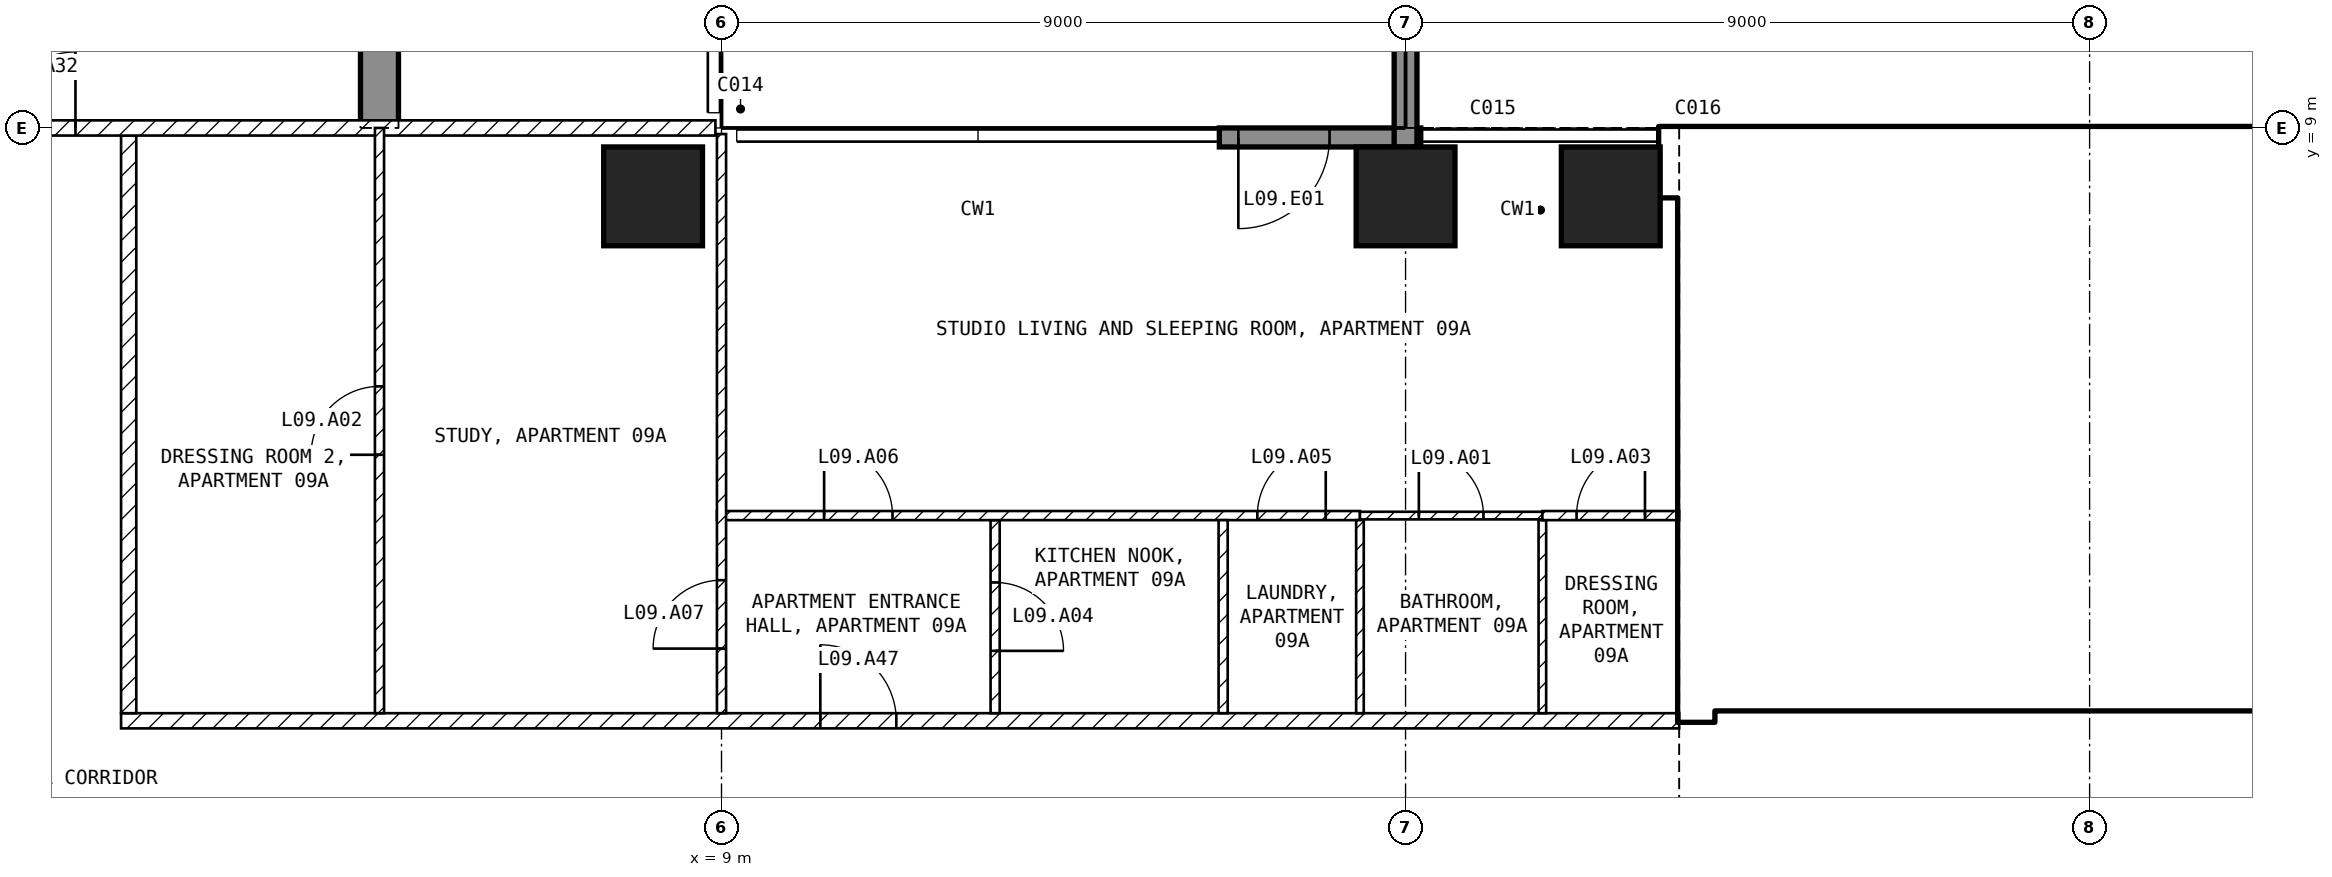
"""IFC4 building model, lengths in metres.
Left out: names, types, materials, properties, quantities, classifications, styles, units other than length and angle.
Written with IfcOpenShell. Run it as: python <this file> out.ifc"""

import sys

from ifc_helpers import new_model, si_unit, direction, frame, frame_2d, origin, origin_2d, place, context, subcontext, project, spatial, polyline, rectangle, outline, extrude, element, fill, save


model = new_model("IFC4")
c1 = context("Model", 3, precision=1e-05, world=origin(), true_north=direction((0.0, 1.0)))
c2 = subcontext(c1, "Body", "Model", "MODEL_VIEW")
j1 = project(units=[si_unit("LENGTHUNIT", "METRE"), si_unit("PLANEANGLEUNIT", "RADIAN")], contexts=[c1])
p1 = place(None, origin())
s1 = spatial("IfcSite", under=j1, at=p1, CompositionType="ELEMENT")
p2 = place(p1, origin())
s2 = spatial("IfcBuilding", under=s1, at=p2, CompositionType="ELEMENT")
p3 = place(p2, frame((0.0, 0.0, 50.5)))
s3 = spatial("IfcBuildingStorey", under=s2, at=p3, CompositionType="ELEMENT", Elevation=50.5)
for number, where, z_axis, x_axis in (
    (1, (8.1, 8.1, -0.25), (0.0, 0.0, 1.0), (1.0, 0.0, 0.0)),
    (2, (18.0, 8.1, -0.25), (0.0, 0.0, 1.0), (1.0, 0.0, 0.0)),
    (3, (20.7, 8.1, -0.25), (0.0, 0.0, 1.0), (1.0, 0.0, 0.0)),
):
    element("IfcColumn", number, at=place(p3, frame(where, z_axis=z_axis, x_axis=x_axis)), inside=s3, PredefinedType="COLUMN", context=c2, shape_type="SweptSolid", body=[
        extrude(rectangle(XDim=1.3, YDim=1.3, at=origin_2d()), origin(), (0.0, 0.0, 1.0), 3.5),
    ])
p4 = place(p3, frame((4.25, 9.0, -0.25), z_axis=(1.0, 0.0, 0.0), x_axis=(0.0, 1.0, 0.0)))
e4 = element("IfcWall", 4, at=p4, inside=s3, PredefinedType="SHEAR", context=c2, shape_type="SweptSolid", body=[
    extrude(outline(polyline([(0.0, 0.0), (2.1, 0.0), (2.1, 2.65), (4.5, 2.65), (4.5, 0.0), (9.9, 0.0), (9.9, 2.65), (12.3, 2.65), (12.3, 0.0), (16.45, 0.0), (16.45, 3.5), (0.0, 3.5), (0.0, 0.0)])), origin(), (0.0, 0.0, 1.0), 0.5),
])
p5 = place(p3, frame((18.2, 8.875, 0.0), z_axis=(0.0, 0.0, 1.0), x_axis=(-1.0, 0.0, 0.0)))
e5 = element("IfcWall", 5, at=p5, inside=s3, PredefinedType="SOLIDWALL", context=c2, shape_type="SweptSolid", body=[
    extrude(rectangle(XDim=2.65, YDim=0.25, at=frame_2d((1.325, 0.0))), origin(), (0.0, 0.0, 1.0), 3.25),
])
p6 = place(p5, frame((1.2, 0.0, 0.0)))
e6 = element("IfcOpeningElement", 6, at=p6, cuts=e5, PredefinedType="OPENING", context=c2, shape_type="SweptSolid", body=[
    extrude(rectangle(XDim=1.2, YDim=2.4, at=frame_2d((0.6, 1.2))), frame((0.0, 0.135, 0.0), z_axis=(0.0, -1.0, 0.0), x_axis=(1.0, 0.0, 0.0)), (0.0, 0.0, 1.0), 0.27),
])
p7 = place(p3, frame((18.0, 8.75, 0.0), z_axis=(0.0, 0.0, 1.0), x_axis=(0.0, 1.0, 0.0)))
e7 = element("IfcWall", 7, at=p7, inside=s3, PredefinedType="SOLIDWALL", context=c2, shape_type="SweptSolid", body=[
    extrude(rectangle(XDim=2.95, YDim=0.3, at=frame_2d((1.475, 0.0))), origin(), (0.0, 0.0, 1.0), 3.25),
])
p8 = place(p3, frame((21.35, 8.55, 0.0), z_axis=(0.0, 0.0, 1.0), x_axis=(1.0, 0.0, 0.0)))
e8 = element("IfcWall", 8, at=p8, inside=s3, PredefinedType="SHEAR", context=c2, shape_type="SweptSolid", body=[
    extrude(rectangle(XDim=10.15, YDim=0.9, at=frame_2d((5.075, 0.0))), origin(), (0.0, 0.0, 1.0), 3.25),
])
p9 = place(p3, frame((21.825, 1.2, 0.0), z_axis=(0.0, 0.0, 1.0), x_axis=(0.0, 1.0, 0.0)))
e9 = element("IfcWall", 9, at=p9, inside=s3, PredefinedType="SHEAR", context=c2, shape_type="SweptSolid", body=[
    extrude(rectangle(XDim=6.9, YDim=0.45, at=frame_2d((3.45, 0.0))), origin(), (0.0, 0.0, 1.0), 3.25),
])
p10 = place(p3, frame((22.05, 1.45, 0.0), z_axis=(0.0, 0.0, 1.0), x_axis=(1.0, 0.0, 0.0)))
e10 = element("IfcWall", 10, at=p10, inside=s3, PredefinedType="SOLIDWALL", context=c2, shape_type="SweptSolid", body=[
    extrude(rectangle(XDim=13.05, YDim=0.2, at=frame_2d((6.525, 0.0))), origin(), (0.0, 0.0, 1.0), 3.25),
])
p11 = place(p10, frame((0.75, 0.0, 0.0)))
e11 = element("IfcOpeningElement", 11, at=p11, cuts=e10, PredefinedType="OPENING", context=c2, shape_type="SweptSolid", body=[
    extrude(rectangle(XDim=1.0, YDim=2.1, at=frame_2d((0.5, 1.05))), frame((0.0, 0.11, 0.0), z_axis=(0.0, -1.0, 0.0), x_axis=(1.0, 0.0, 0.0)), (0.0, 0.0, 1.0), 0.22),
])
p12 = place(p10, frame((3.25, 0.0, 0.0)))
e12 = element("IfcOpeningElement", 12, at=p12, cuts=e10, PredefinedType="OPENING", context=c2, shape_type="SweptSolid", body=[
    extrude(rectangle(XDim=1.0, YDim=2.1, at=frame_2d((0.5, 1.05))), frame((0.0, 0.11, 0.0), z_axis=(0.0, -1.0, 0.0), x_axis=(1.0, 0.0, 0.0)), (0.0, 0.0, 1.0), 0.22),
])
p13 = place(p3, frame((22.05, 5.15, 0.0), z_axis=(0.0, 0.0, 1.0), x_axis=(1.0, 0.0, 0.0)))
e13 = element("IfcWall", 13, at=p13, inside=s3, PredefinedType="SOLIDWALL", context=c2, shape_type="SweptSolid", body=[
    extrude(rectangle(XDim=6.3, YDim=0.2, at=frame_2d((3.15, 0.0))), origin(), (0.0, 0.0, 1.0), 3.25),
])
p14 = place(p13, frame((0.2, 0.0, 0.0)))
e14 = element("IfcOpeningElement", 14, at=p14, cuts=e13, PredefinedType="OPENING", context=c2, shape_type="SweptSolid", body=[
    extrude(rectangle(XDim=1.0, YDim=2.1, at=frame_2d((0.5, 1.05))), frame((0.0, 0.11, 0.0), z_axis=(0.0, -1.0, 0.0), x_axis=(1.0, 0.0, 0.0)), (0.0, 0.0, 1.0), 0.22),
])
p15 = place(p3, frame((28.25, 5.25, 0.0), z_axis=(0.0, 0.0, 1.0), x_axis=(0.0, 1.0, 0.0)))
e15 = element("IfcWall", 15, at=p15, inside=s3, PredefinedType="SOLIDWALL", context=c2, shape_type="SweptSolid", body=[
    extrude(rectangle(XDim=2.85, YDim=0.2, at=frame_2d((1.425, 0.0))), origin(), (0.0, 0.0, 1.0), 3.25),
])
p16 = place(p3, frame((27.2, 3.95, 0.0), z_axis=(0.0, 0.0, 1.0), x_axis=(1.0, 0.0, 0.0)))
e16 = element("IfcWall", 16, at=p16, inside=s3, PredefinedType="SOLIDWALL", context=c2, shape_type="SweptSolid", body=[
    extrude(rectangle(XDim=7.9, YDim=0.2, at=frame_2d((3.95, 0.0))), origin(), (0.0, 0.0, 1.0), 3.25),
])
p17 = place(p3, frame((27.1, 1.55, 0.0), z_axis=(0.0, 0.0, 1.0), x_axis=(0.0, 1.0, 0.0)))
e17 = element("IfcWall", 17, at=p17, inside=s3, PredefinedType="SOLIDWALL", context=c2, shape_type="SweptSolid", body=[
    extrude(rectangle(XDim=3.5, YDim=0.2, at=frame_2d((1.75, 0.0))), origin(), (0.0, 0.0, 1.0), 3.25),
])
p18 = place(p17, frame((0.6, 0.0, 0.0)))
e18 = element("IfcOpeningElement", 18, at=p18, cuts=e17, PredefinedType="OPENING", context=c2, shape_type="SweptSolid", body=[
    extrude(rectangle(XDim=1.1, YDim=2.1, at=frame_2d((0.55, 1.05))), frame((0.0, 0.11, 0.0), z_axis=(0.0, -1.0, 0.0), x_axis=(1.0, 0.0, 0.0)), (0.0, 0.0, 1.0), 0.22),
])
p19 = place(p17, frame((2.6, 0.0, 0.0)))
e19 = element("IfcOpeningElement", 19, at=p19, cuts=e17, PredefinedType="OPENING", context=c2, shape_type="SweptSolid", body=[
    extrude(rectangle(XDim=0.8, YDim=2.1, at=frame_2d((0.4, 1.05))), frame((0.0, 0.11, 0.0), z_axis=(0.0, -1.0, 0.0), x_axis=(1.0, 0.0, 0.0)), (0.0, 0.0, 1.0), 0.22),
])
p20 = place(p3, frame((1.1, 1.2, 0.0), z_axis=(0.0, 0.0, 1.0), x_axis=(1.0, 0.0, 0.0)))
e20 = element("IfcWall", 20, at=p20, inside=s3, PredefinedType="PARTITIONING", context=c2, shape_type="SweptSolid", body=[
    extrude(rectangle(XDim=20.5, YDim=0.2, at=frame_2d((10.25, 0.0))), origin(), (0.0, 0.0, 1.0), 3.25),
])
p21 = place(p20, frame((9.2, 0.0, 0.0)))
e21 = element("IfcOpeningElement", 21, at=p21, cuts=e20, PredefinedType="OPENING", context=c2, shape_type="SweptSolid", body=[
    extrude(rectangle(XDim=1.0, YDim=2.1, at=frame_2d((0.5, 1.05))), frame((0.0, 0.11, 0.0), z_axis=(0.0, -1.0, 0.0), x_axis=(1.0, 0.0, 0.0)), (0.0, 0.0, 1.0), 0.22),
])
p22 = place(p3, frame((1.2, 8.9, 0.0), z_axis=(0.0, 0.0, 1.0), x_axis=(0.0, -1.0, 0.0)))
e22 = element("IfcWall", 22, at=p22, inside=s3, PredefinedType="PARTITIONING", context=c2, shape_type="SweptSolid", body=[
    extrude(rectangle(XDim=7.6, YDim=0.2, at=frame_2d((3.8, 0.0))), origin(), (0.0, 0.0, 1.0), 3.25),
])
p23 = place(p3, frame((-8.92, 9.0, 0.0), z_axis=(0.0, 0.0, 1.0), x_axis=(1.0, 0.0, 0.0)))
e23 = element("IfcWall", 23, at=p23, inside=s3, PredefinedType="PARTITIONING", context=c2, shape_type="SweptSolid", body=[
    extrude(rectangle(XDim=17.84, YDim=0.2, at=frame_2d((8.92, 0.0))), origin(), (0.0, 0.0, 1.0), 3.25),
])
p24 = place(p23, frame((8.42, 0.0, 0.0)))
e24 = element("IfcOpeningElement", 24, at=p24, cuts=e23, PredefinedType="OPENING", context=c2, shape_type="SweptSolid", body=[
    extrude(rectangle(XDim=1.0, YDim=2.1, at=frame_2d((0.5, 1.05))), frame((0.0, 0.11, 0.0), z_axis=(0.0, -1.0, 0.0), x_axis=(1.0, 0.0, 0.0)), (0.0, 0.0, 1.0), 0.22),
])
p25 = place(p3, frame((12.6, 3.84, 0.0), z_axis=(0.0, 0.0, 1.0), x_axis=(0.0, -1.0, 0.0)))
e25 = element("IfcWall", 25, at=p25, inside=s3, PredefinedType="PARTITIONING", context=c2, shape_type="SweptSolid", body=[
    extrude(rectangle(XDim=2.54, YDim=0.12, at=frame_2d((1.27, 0.0))), origin(), (0.0, 0.0, 1.0), 3.25),
])
p26 = place(p25, frame((0.82, 0.0, 0.0)))
e26 = element("IfcOpeningElement", 26, at=p26, cuts=e25, PredefinedType="OPENING", context=c2, shape_type="SweptSolid", body=[
    extrude(rectangle(XDim=0.9, YDim=2.1, at=frame_2d((0.45, 1.05))), frame((0.0, 0.07, 0.0), z_axis=(0.0, -1.0, 0.0), x_axis=(1.0, 0.0, 0.0)), (0.0, 0.0, 1.0), 0.14),
])
p27 = place(p3, frame((8.94, 3.9, 0.0), z_axis=(0.0, 0.0, 1.0), x_axis=(1.0, 0.0, 0.0)))
e27 = element("IfcWall", 27, at=p27, inside=s3, PredefinedType="PARTITIONING", context=c2, shape_type="SweptSolid", body=[
    extrude(rectangle(XDim=8.46, YDim=0.12, at=frame_2d((4.23, 0.0))), origin(), (0.0, 0.0, 1.0), 3.25),
])
p28 = place(p27, frame((7.11, 0.0, 0.0)))
e28 = element("IfcOpeningElement", 28, at=p28, cuts=e27, PredefinedType="OPENING", context=c2, shape_type="SweptSolid", body=[
    extrude(rectangle(XDim=0.9, YDim=2.1, at=frame_2d((0.45, 1.05))), frame((0.0, 0.07, 0.0), z_axis=(0.0, -1.0, 0.0), x_axis=(1.0, 0.0, 0.0)), (0.0, 0.0, 1.0), 0.14),
])
p29 = place(p27, frame((1.41, 0.0, 0.0)))
e29 = element("IfcOpeningElement", 29, at=p29, cuts=e27, PredefinedType="OPENING", context=c2, shape_type="SweptSolid", body=[
    extrude(rectangle(XDim=0.9, YDim=2.1, at=frame_2d((0.45, 1.05))), frame((0.0, 0.07, 0.0), z_axis=(0.0, -1.0, 0.0), x_axis=(1.0, 0.0, 0.0)), (0.0, 0.0, 1.0), 0.14),
])
p30 = place(p3, frame((9.0, 1.3, 0.0), z_axis=(0.0, 0.0, 1.0), x_axis=(0.0, 1.0, 0.0)))
e30 = element("IfcWall", 30, at=p30, inside=s3, PredefinedType="PARTITIONING", context=c2, shape_type="SweptSolid", body=[
    extrude(rectangle(XDim=7.62, YDim=0.12, at=frame_2d((3.81, 0.0))), origin(), (0.0, 0.0, 1.0), 3.25),
])
p31 = place(p30, frame((0.85, 0.0, 0.0)))
e31 = element("IfcOpeningElement", 31, at=p31, cuts=e30, PredefinedType="OPENING", context=c2, shape_type="SweptSolid", body=[
    extrude(rectangle(XDim=0.9, YDim=2.1, at=frame_2d((0.45, 1.05))), frame((0.0, 0.07, 0.0), z_axis=(0.0, -1.0, 0.0), x_axis=(1.0, 0.0, 0.0)), (0.0, 0.0, 1.0), 0.14),
])
p32 = place(p3, frame((15.6, 3.84, 0.0), z_axis=(0.0, 0.0, 1.0), x_axis=(0.0, -1.0, 0.0)))
e32 = element("IfcWall", 32, at=p32, inside=s3, PredefinedType="PARTITIONING", context=c2, shape_type="SweptSolid", body=[
    extrude(rectangle(XDim=2.54, YDim=0.12, at=frame_2d((1.27, 0.0))), origin(), (0.0, 0.0, 1.0), 3.25),
])
for number, where, z_axis, x_axis in (
    (33, (17.4, 3.84, 0.0), (0.0, 0.0, 1.0), (0.0, -1.0, 0.0)),
    (34, (19.8, 3.84, 0.0), (0.0, 0.0, 1.0), (0.0, -1.0, 0.0)),
):
    element("IfcWall", number, at=place(p3, frame(where, z_axis=z_axis, x_axis=x_axis)), inside=s3, PredefinedType="PARTITIONING", context=c2, shape_type="SweptSolid", body=[
        extrude(rectangle(XDim=2.54, YDim=0.1, at=frame_2d((1.27, 0.0))), origin(), (0.0, 0.0, 1.0), 3.25),
    ])
p33 = place(p3, frame((17.4, 3.9, 0.0), z_axis=(0.0, 0.0, 1.0), x_axis=(1.0, 0.0, 0.0)))
e35 = element("IfcWall", 35, at=p33, inside=s3, PredefinedType="PARTITIONING", context=c2, shape_type="SweptSolid", body=[
    extrude(rectangle(XDim=2.4, YDim=0.1, at=frame_2d((1.2, 0.0))), origin(), (0.0, 0.0, 1.0), 3.25),
])
p34 = place(p33, frame((0.775, 0.0, 0.0)))
e36 = element("IfcOpeningElement", 36, at=p34, cuts=e35, PredefinedType="OPENING", context=c2, shape_type="SweptSolid", body=[
    extrude(rectangle(XDim=0.85, YDim=2.1, at=frame_2d((0.425, 1.05))), frame((0.0, 0.06, 0.0), z_axis=(0.0, -1.0, 0.0), x_axis=(1.0, 0.0, 0.0)), (0.0, 0.0, 1.0), 0.12),
])
p35 = place(p3, frame((19.8, 3.9, 0.0), z_axis=(0.0, 0.0, 1.0), x_axis=(1.0, 0.0, 0.0)))
e37 = element("IfcWall", 37, at=p35, inside=s3, PredefinedType="PARTITIONING", context=c2, shape_type="SweptSolid", body=[
    extrude(rectangle(XDim=1.8, YDim=0.12, at=frame_2d((0.9, 0.0))), origin(), (0.0, 0.0, 1.0), 3.25),
])
p36 = place(p35, frame((0.45, 0.0, 0.0)))
e38 = element("IfcOpeningElement", 38, at=p36, cuts=e37, PredefinedType="OPENING", context=c2, shape_type="SweptSolid", body=[
    extrude(rectangle(XDim=0.9, YDim=2.1, at=frame_2d((0.45, 1.05))), frame((0.0, 0.07, 0.0), z_axis=(0.0, -1.0, 0.0), x_axis=(1.0, 0.0, 0.0)), (0.0, 0.0, 1.0), 0.14),
])
p37 = place(p3, frame((4.5, 1.3, 0.0), z_axis=(0.0, 0.0, 1.0), x_axis=(0.0, 1.0, 0.0)))
e39 = element("IfcWall", 39, at=p37, inside=s3, PredefinedType="PARTITIONING", context=c2, shape_type="SweptSolid", body=[
    extrude(rectangle(XDim=7.7, YDim=0.12, at=frame_2d((3.85, 0.0))), origin(), (0.0, 0.0, 1.0), 3.25),
])
p38 = place(p37, frame((3.4, 0.0, 0.0)))
e40 = element("IfcOpeningElement", 40, at=p38, cuts=e39, PredefinedType="OPENING", context=c2, shape_type="SweptSolid", body=[
    extrude(rectangle(XDim=0.9, YDim=2.1, at=frame_2d((0.45, 1.05))), frame((0.0, 0.07, 0.0), z_axis=(0.0, -1.0, 0.0), x_axis=(1.0, 0.0, 0.0)), (0.0, 0.0, 1.0), 0.14),
])
p39 = place(p6, origin())
e41 = element("IfcDoor", 41, at=p39, inside=s3, OperationType="SINGLE_SWING_RIGHT", PredefinedType="DOOR", context=c2, shape_type="SweptSolid", body=[
    extrude(rectangle(XDim=1.2, YDim=2.4, at=frame_2d((0.6, 1.2))), frame((0.0, 0.025, 0.0), z_axis=(0.0, -1.0, 0.0), x_axis=(1.0, 0.0, 0.0)), (0.0, 0.0, 1.0), 0.05),
])
fill(e6, e41)
p40 = place(p18, origin())
e42 = element("IfcDoor", 42, at=p40, inside=s3, OperationType="DOUBLE_DOOR_SLIDING", PredefinedType="DOOR", context=c2, shape_type="SweptSolid", body=[
    extrude(rectangle(XDim=1.1, YDim=2.1, at=frame_2d((0.55, 1.05))), frame((0.0, 0.025, 0.0), z_axis=(0.0, -1.0, 0.0), x_axis=(1.0, 0.0, 0.0)), (0.0, 0.0, 1.0), 0.05),
])
fill(e18, e42)
p41 = place(p14, origin())
e43 = element("IfcDoor", 43, at=p41, inside=s3, OperationType="SINGLE_SWING_LEFT", PredefinedType="DOOR", context=c2, shape_type="SweptSolid", body=[
    extrude(rectangle(XDim=1.0, YDim=2.1, at=frame_2d((0.5, 1.05))), frame((0.0, 0.025, 0.0), z_axis=(0.0, -1.0, 0.0), x_axis=(1.0, 0.0, 0.0)), (0.0, 0.0, 1.0), 0.05),
])
fill(e14, e43)
p42 = place(p11, origin())
e44 = element("IfcDoor", 44, at=p42, inside=s3, OperationType="SINGLE_SWING_LEFT", PredefinedType="DOOR", context=c2, shape_type="SweptSolid", body=[
    extrude(rectangle(XDim=1.0, YDim=2.1, at=frame_2d((0.5, 1.05))), frame((0.0, 0.025, 0.0), z_axis=(0.0, -1.0, 0.0), x_axis=(1.0, 0.0, 0.0)), (0.0, 0.0, 1.0), 0.05),
])
fill(e11, e44)
p43 = place(p12, origin())
e45 = element("IfcDoor", 45, at=p43, inside=s3, OperationType="SINGLE_SWING_LEFT", PredefinedType="DOOR", context=c2, shape_type="SweptSolid", body=[
    extrude(rectangle(XDim=1.0, YDim=2.1, at=frame_2d((0.5, 1.05))), frame((0.0, 0.025, 0.0), z_axis=(0.0, -1.0, 0.0), x_axis=(1.0, 0.0, 0.0)), (0.0, 0.0, 1.0), 0.05),
])
fill(e12, e45)
p44 = place(p19, origin())
e46 = element("IfcDoor", 46, at=p44, inside=s3, OperationType="SINGLE_SWING_LEFT", PredefinedType="DOOR", context=c2, shape_type="SweptSolid", body=[
    extrude(rectangle(XDim=0.8, YDim=2.1, at=frame_2d((0.4, 1.05))), frame((0.0, 0.025, 0.0), z_axis=(0.0, -1.0, 0.0), x_axis=(1.0, 0.0, 0.0)), (0.0, 0.0, 1.0), 0.05),
])
fill(e19, e46)
p45 = place(p34, origin())
e47 = element("IfcDoor", 47, at=p45, inside=s3, OperationType="SINGLE_SWING_LEFT", PredefinedType="DOOR", context=c2, shape_type="SweptSolid", body=[
    extrude(rectangle(XDim=0.85, YDim=2.1, at=frame_2d((0.425, 1.05))), frame((0.0, 0.025, 0.0), z_axis=(0.0, -1.0, 0.0), x_axis=(1.0, 0.0, 0.0)), (0.0, 0.0, 1.0), 0.05),
])
fill(e36, e47)
p46 = place(p38, origin())
e48 = element("IfcDoor", 48, at=p46, inside=s3, OperationType="SINGLE_SWING_LEFT", PredefinedType="DOOR", context=c2, shape_type="SweptSolid", body=[
    extrude(rectangle(XDim=0.9, YDim=2.1, at=frame_2d((0.45, 1.05))), frame((0.0, 0.025, 0.0), z_axis=(0.0, -1.0, 0.0), x_axis=(1.0, 0.0, 0.0)), (0.0, 0.0, 1.0), 0.05),
])
fill(e40, e48)
p47 = place(p36, origin())
e49 = element("IfcDoor", 49, at=p47, inside=s3, OperationType="SINGLE_SWING_RIGHT", PredefinedType="DOOR", context=c2, shape_type="SweptSolid", body=[
    extrude(rectangle(XDim=0.9, YDim=2.1, at=frame_2d((0.45, 1.05))), frame((0.0, 0.025, 0.0), z_axis=(0.0, -1.0, 0.0), x_axis=(1.0, 0.0, 0.0)), (0.0, 0.0, 1.0), 0.05),
])
fill(e38, e49)
p48 = place(p26, origin())
e50 = element("IfcDoor", 50, at=p48, inside=s3, OperationType="SINGLE_SWING_RIGHT", PredefinedType="DOOR", context=c2, shape_type="SweptSolid", body=[
    extrude(rectangle(XDim=0.9, YDim=2.1, at=frame_2d((0.45, 1.05))), frame((0.0, 0.025, 0.0), z_axis=(0.0, -1.0, 0.0), x_axis=(1.0, 0.0, 0.0)), (0.0, 0.0, 1.0), 0.05),
])
fill(e26, e50)
p49 = place(p28, origin())
e51 = element("IfcDoor", 51, at=p49, inside=s3, OperationType="SINGLE_SWING_RIGHT", PredefinedType="DOOR", context=c2, shape_type="SweptSolid", body=[
    extrude(rectangle(XDim=0.9, YDim=2.1, at=frame_2d((0.45, 1.05))), frame((0.0, 0.025, 0.0), z_axis=(0.0, -1.0, 0.0), x_axis=(1.0, 0.0, 0.0)), (0.0, 0.0, 1.0), 0.05),
])
fill(e28, e51)
p50 = place(p29, origin())
e52 = element("IfcDoor", 52, at=p50, inside=s3, OperationType="SINGLE_SWING_LEFT", PredefinedType="DOOR", context=c2, shape_type="SweptSolid", body=[
    extrude(rectangle(XDim=0.9, YDim=2.1, at=frame_2d((0.45, 1.05))), frame((0.0, 0.025, 0.0), z_axis=(0.0, -1.0, 0.0), x_axis=(1.0, 0.0, 0.0)), (0.0, 0.0, 1.0), 0.05),
])
fill(e29, e52)
p51 = place(p31, origin())
e53 = element("IfcDoor", 53, at=p51, inside=s3, OperationType="SINGLE_SWING_LEFT", PredefinedType="DOOR", context=c2, shape_type="SweptSolid", body=[
    extrude(rectangle(XDim=0.9, YDim=2.1, at=frame_2d((0.45, 1.05))), frame((0.0, 0.025, 0.0), z_axis=(0.0, -1.0, 0.0), x_axis=(1.0, 0.0, 0.0)), (0.0, 0.0, 1.0), 0.05),
])
fill(e31, e53)
p52 = place(p24, origin())
e54 = element("IfcDoor", 54, at=p52, inside=s3, OperationType="SINGLE_SWING_RIGHT", PredefinedType="DOOR", context=c2, shape_type="SweptSolid", body=[
    extrude(rectangle(XDim=1.0, YDim=2.1, at=frame_2d((0.5, 1.05))), frame((0.0, 0.025, 0.0), z_axis=(0.0, -1.0, 0.0), x_axis=(1.0, 0.0, 0.0)), (0.0, 0.0, 1.0), 0.05),
])
fill(e24, e54)
p53 = place(p21, origin())
e55 = element("IfcDoor", 55, at=p53, inside=s3, OperationType="SINGLE_SWING_LEFT", PredefinedType="DOOR", context=c2, shape_type="SweptSolid", body=[
    extrude(rectangle(XDim=1.0, YDim=2.1, at=frame_2d((0.5, 1.05))), frame((0.0, 0.025, 0.0), z_axis=(0.0, -1.0, 0.0), x_axis=(1.0, 0.0, 0.0)), (0.0, 0.0, 1.0), 0.05),
])
fill(e21, e55)
save(model, sys.argv[1])
